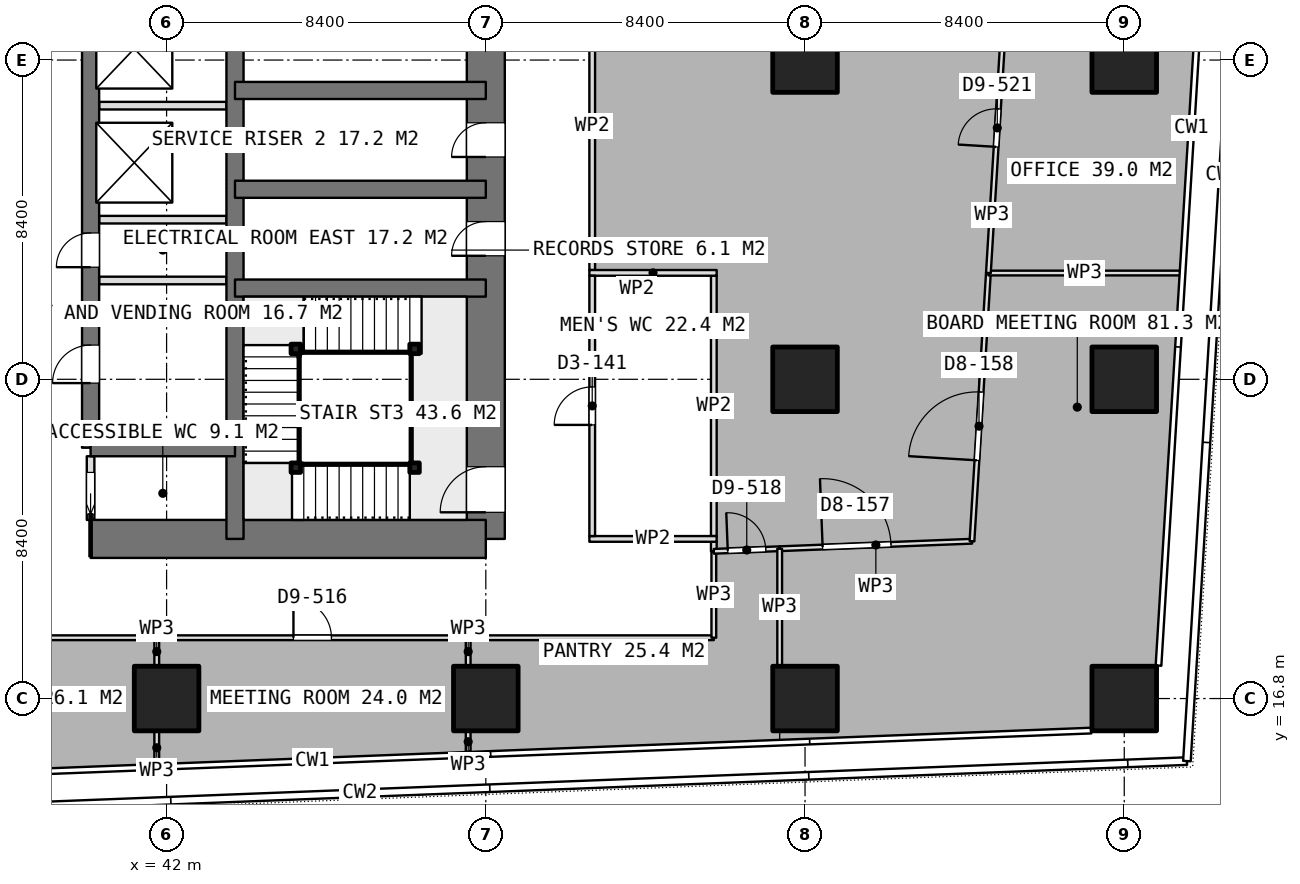
"""IFC4 building model, lengths in metres.
Left out: names, types, materials, properties, quantities, classifications, styles, units other than length and angle.
Written with IfcOpenShell. Run it as: python <this file> out.ifc"""

import sys

from ifc_helpers import new_model, si_unit, direction, frame, frame_2d, origin, origin_2d, place, context, subcontext, project, spatial, rectangle, extrude, element, fill, save


model = new_model("IFC4")
c1 = context("Model", 3, precision=1e-05, world=origin(), true_north=direction((0.0, 1.0)))
c2 = subcontext(c1, "Body", "Model", "MODEL_VIEW")
j1 = project(units=[si_unit("LENGTHUNIT", "METRE"), si_unit("PLANEANGLEUNIT", "RADIAN")], contexts=[c1])
p1 = place(None, origin())
s1 = spatial("IfcSite", under=j1, at=p1, CompositionType="ELEMENT")
p2 = place(p1, origin())
s2 = spatial("IfcBuilding", under=s1, at=p2, CompositionType="ELEMENT")
p3 = place(p2, frame((0.0, 0.0, 132.8)))
s3 = spatial("IfcBuildingStorey", under=s2, at=p3, CompositionType="ELEMENT", Elevation=132.8)
p4 = place(p3, frame((40.0, 21.0, 0.0), z_axis=(0.0, 0.0, 1.0), x_axis=(1.0, 0.0, 0.0)))
e1 = element("IfcWall", 1, at=p4, inside=s3, PredefinedType="SHEAR", context=c2, shape_type="SweptSolid", body=[
    extrude(rectangle(XDim=10.4, YDim=1.0, at=frame_2d((5.2, 0.0))), origin(), (0.0, 0.0, 1.0), 3.75),
])
p5 = place(p3, frame((50.4, 21.0, 0.0), z_axis=(0.0, 0.0, 1.0), x_axis=(0.0, 1.0, 0.0)))
e2 = element("IfcWall", 2, at=p5, inside=s3, PredefinedType="SHEAR", context=c2, shape_type="SweptSolid", body=[
    extrude(rectangle(XDim=25.2, YDim=1.0, at=frame_2d((12.6, 0.0))), origin(), (0.0, 0.0, 1.0), 3.75),
])
p6 = place(p5, frame((16.2, 0.0, 0.0)))
e3 = element("IfcOpeningElement", 3, at=p6, cuts=e2, PredefinedType="OPENING", context=c2, shape_type="SweptSolid", body=[
    extrude(rectangle(XDim=1.2, YDim=2.1, at=frame_2d((0.6, 1.05))), frame((0.0, 0.51, 0.0), z_axis=(0.0, -1.0, 0.0), x_axis=(1.0, 0.0, 0.0)), (0.0, 0.0, 1.0), 1.02),
])
p7 = place(p5, frame((10.05, 0.0, 0.0)))
e4 = element("IfcOpeningElement", 4, at=p7, cuts=e2, PredefinedType="OPENING", context=c2, shape_type="SweptSolid", body=[
    extrude(rectangle(XDim=0.9, YDim=2.1, at=frame_2d((0.45, 1.05))), frame((0.0, 0.51, 0.0), z_axis=(0.0, -1.0, 0.0), x_axis=(1.0, 0.0, 0.0)), (0.0, 0.0, 1.0), 1.02),
])
p8 = place(p5, frame((7.45, 0.0, 0.0)))
e5 = element("IfcOpeningElement", 5, at=p8, cuts=e2, PredefinedType="OPENING", context=c2, shape_type="SweptSolid", body=[
    extrude(rectangle(XDim=0.9, YDim=2.1, at=frame_2d((0.45, 1.05))), frame((0.0, 0.51, 0.0), z_axis=(0.0, -1.0, 0.0), x_axis=(1.0, 0.0, 0.0)), (0.0, 0.0, 1.0), 1.02),
])
p9 = place(p5, frame((0.7, 0.0, 0.0)))
e6 = element("IfcOpeningElement", 6, at=p9, cuts=e2, PredefinedType="OPENING", context=c2, shape_type="SweptSolid", body=[
    extrude(rectangle(XDim=1.2, YDim=2.1, at=frame_2d((0.6, 1.05))), frame((0.0, 0.51, 0.0), z_axis=(0.0, -1.0, 0.0), x_axis=(1.0, 0.0, 0.0)), (0.0, 0.0, 1.0), 1.02),
])
p10 = place(p3, frame((43.8, 21.0, 0.0), z_axis=(0.0, 0.0, 1.0), x_axis=(0.0, 1.0, 0.0)))
e7 = element("IfcWall", 7, at=p10, inside=s3, PredefinedType="SHEAR", context=c2, shape_type="SweptSolid", body=[
    extrude(rectangle(XDim=25.2, YDim=0.45, at=frame_2d((12.6, 0.0))), origin(), (0.0, 0.0, 1.0), 3.75),
])
p11 = place(p3, frame((40.0, 23.4, 0.0), z_axis=(0.0, 0.0, 1.0), x_axis=(0.0, 1.0, 0.0)))
e8 = element("IfcWall", 8, at=p11, inside=s3, PredefinedType="SHEAR", context=c2, shape_type="SweptSolid", body=[
    extrude(rectangle(XDim=18.0, YDim=0.45, at=frame_2d((9.0, 0.0))), origin(), (0.0, 0.0, 1.0), 3.75),
])
p12 = place(p11, frame((1.7, 0.0, 0.0)))
e9 = element("IfcOpeningElement", 9, at=p12, cuts=e8, PredefinedType="OPENING", context=c2, shape_type="SweptSolid", body=[
    extrude(rectangle(XDim=1.0, YDim=2.1, at=frame_2d((0.5, 1.05))), frame((0.0, 0.235, 0.0), z_axis=(0.0, -1.0, 0.0), x_axis=(1.0, 0.0, 0.0)), (0.0, 0.0, 1.0), 0.47),
])
p13 = place(p11, frame((4.75, 0.0, 0.0)))
e10 = element("IfcOpeningElement", 10, at=p13, cuts=e8, PredefinedType="OPENING", context=c2, shape_type="SweptSolid", body=[
    extrude(rectangle(XDim=0.9, YDim=2.1, at=frame_2d((0.45, 1.05))), frame((0.0, 0.235, 0.0), z_axis=(0.0, -1.0, 0.0), x_axis=(1.0, 0.0, 0.0)), (0.0, 0.0, 1.0), 0.47),
])
p14 = place(p3, frame((40.0, 23.4, 0.0), z_axis=(0.0, 0.0, 1.0), x_axis=(1.0, 0.0, 0.0)))
e11 = element("IfcWall", 11, at=p14, inside=s3, PredefinedType="SHEAR", context=c2, shape_type="SweptSolid", body=[
    extrude(rectangle(XDim=3.8, YDim=0.45, at=frame_2d((1.9, 0.0))), origin(), (0.0, 0.0, 1.0), 3.75),
])
for number, where, z_axis, x_axis in (
    (12, (43.8, 27.6, 0.0), (0.0, 0.0, 1.0), (1.0, 0.0, 0.0)),
    (13, (43.8, 30.2, 0.0), (0.0, 0.0, 1.0), (1.0, 0.0, 0.0)),
    (14, (43.8, 32.8, 0.0), (0.0, 0.0, 1.0), (1.0, 0.0, 0.0)),
):
    element("IfcWall", number, at=place(p3, frame(where, z_axis=z_axis, x_axis=x_axis)), inside=s3, PredefinedType="SHEAR", context=c2, shape_type="SweptSolid", body=[
        extrude(rectangle(XDim=6.6, YDim=0.45, at=frame_2d((3.3, 0.0))), origin(), (0.0, 0.0, 1.0), 3.75),
    ])
for number, where, z_axis, x_axis in (
    (15, (42.0, 16.8, 0.0), (0.0, 0.0, 1.0), (1.0, 0.0, 0.0)),
    (16, (50.4, 16.8, 0.0), (0.0, 0.0, 1.0), (1.0, 0.0, 0.0)),
    (17, (58.8, 16.8, 0.0), (0.0, 0.0, 1.0), (1.0, 0.0, 0.0)),
    (18, (58.8, 25.2, 0.0), (0.0, 0.0, 1.0), (1.0, 0.0, 0.0)),
    (19, (58.8, 33.6, 0.0), (0.0, 0.0, 1.0), (1.0, 0.0, 0.0)),
    (20, (67.2, 16.8, 0.0), (0.0, 0.0, 1.0), (1.0, 0.0, 0.0)),
    (21, (67.2, 25.2, 0.0), (0.0, 0.0, 1.0), (1.0, 0.0, 0.0)),
    (22, (67.2, 33.6, 0.0), (0.0, 0.0, 1.0), (1.0, 0.0, 0.0)),
):
    element("IfcColumn", number, at=place(p3, frame(where, z_axis=z_axis, x_axis=x_axis)), inside=s3, PredefinedType="COLUMN", context=c2, shape_type="SweptSolid", body=[
        extrude(rectangle(XDim=1.7, YDim=1.7, at=origin_2d()), origin(), (0.0, 0.0, 1.0), 3.75),
    ])
for number, where, z_axis, x_axis in (
    (23, (40.225, 29.4, 0.0), (0.0, 0.0, 1.0), (1.0, 0.0, 0.0)),
    (24, (40.225, 32.4, 0.0), (0.0, 0.0, 1.0), (1.0, 0.0, 0.0)),
):
    element("IfcWall", number, at=place(p3, frame(where, z_axis=z_axis, x_axis=x_axis)), inside=s3, PredefinedType="PARTITIONING", context=c2, shape_type="SweptSolid", body=[
        extrude(rectangle(XDim=3.35, YDim=0.2, at=frame_2d((1.675, 0.0))), origin(), (0.0, 0.0, 1.0), 3.5),
    ])
p15 = place(p3, frame((40.0, 21.5, 0.0), z_axis=(0.0, 0.0, 1.0), x_axis=(0.0, 1.0, 0.0)))
e25 = element("IfcWall", 25, at=p15, inside=s3, PredefinedType="PARTITIONING", context=c2, shape_type="SweptSolid", body=[
    extrude(rectangle(XDim=1.675, YDim=0.2, at=frame_2d((0.837, 0.0))), origin(), (0.0, 0.0, 1.0), 3.5),
])
p16 = place(p15, frame((0.15, 0.0, 0.0)))
e26 = element("IfcOpeningElement", 26, at=p16, cuts=e25, PredefinedType="OPENING", context=c2, shape_type="SweptSolid", body=[
    extrude(rectangle(XDim=1.1, YDim=2.1, at=frame_2d((0.55, 1.05))), frame((0.0, 0.11, 0.0), z_axis=(0.0, -1.0, 0.0), x_axis=(1.0, 0.0, 0.0)), (0.0, 0.0, 1.0), 0.22),
])
p17 = place(p3, frame((40.225, 27.8, 0.0), z_axis=(0.0, 0.0, 1.0), x_axis=(1.0, 0.0, 0.0)))
e27 = element("IfcWall", 27, at=p17, inside=s3, PredefinedType="PARTITIONING", context=c2, shape_type="SweptSolid", body=[
    extrude(rectangle(XDim=3.35, YDim=0.2, at=frame_2d((1.675, 0.0))), origin(), (0.0, 0.0, 1.0), 3.5),
])
for number, where, z_axis, x_axis in (
    (28, (53.125, 21.0, 0.0), (0.0, 0.0, 1.0), (1.0, 0.0, 0.0)),
    (29, (53.125, 28.0, 0.0), (0.0, 0.0, 1.0), (1.0, 0.0, 0.0)),
):
    element("IfcWall", number, at=place(p3, frame(where, z_axis=z_axis, x_axis=x_axis)), inside=s3, PredefinedType="PARTITIONING", context=c2, shape_type="SweptSolid", body=[
        extrude(rectangle(XDim=3.35, YDim=0.15, at=frame_2d((1.675, 0.0))), origin(), (0.0, 0.0, 1.0), 3.5),
    ])
p18 = place(p3, frame((53.2, 21.075, 0.0), z_axis=(0.0, 0.0, 1.0), x_axis=(0.0, 1.0, 0.0)))
e30 = element("IfcWall", 30, at=p18, inside=s3, PredefinedType="PARTITIONING", context=c2, shape_type="SweptSolid", body=[
    extrude(rectangle(XDim=6.85, YDim=0.15, at=frame_2d((3.425, 0.0))), origin(), (0.0, 0.0, 1.0), 3.5),
])
p19 = place(p18, frame((2.925, 0.0, 0.0)))
e31 = element("IfcOpeningElement", 31, at=p19, cuts=e30, PredefinedType="OPENING", context=c2, shape_type="SweptSolid", body=[
    extrude(rectangle(XDim=1.0, YDim=2.1, at=frame_2d((0.5, 1.05))), frame((0.0, 0.085, 0.0), z_axis=(0.0, -1.0, 0.0), x_axis=(1.0, 0.0, 0.0)), (0.0, 0.0, 1.0), 0.17),
])
p20 = place(p3, frame((56.4, 21.075, 0.0), z_axis=(0.0, 0.0, 1.0), x_axis=(0.0, 1.0, 0.0)))
e32 = element("IfcWall", 32, at=p20, inside=s3, PredefinedType="PARTITIONING", context=c2, shape_type="SweptSolid", body=[
    extrude(rectangle(XDim=6.85, YDim=0.15, at=frame_2d((3.425, 0.0))), origin(), (0.0, 0.0, 1.0), 3.5),
])
p21 = place(p3, frame((41.741, 18.4, 0.0), z_axis=(0.0, 0.0, 1.0), x_axis=(1.0, 0.0, 0.0)))
e33 = element("IfcWall", 33, at=p21, inside=s3, PredefinedType="PARTITIONING", context=c2, shape_type="SweptSolid", body=[
    extrude(rectangle(XDim=8.195, YDim=0.125, at=frame_2d((4.098, 0.0))), origin(), (0.0, 0.0, 1.0), 3.5),
])
p22 = place(p21, frame((3.597, 0.0, 0.0)))
e34 = element("IfcOpeningElement", 34, at=p22, cuts=e33, PredefinedType="OPENING", context=c2, shape_type="SweptSolid", body=[
    extrude(rectangle(XDim=1.0, YDim=2.1, at=frame_2d((0.5, 1.05))), frame((0.0, 0.073, 0.0), z_axis=(0.0, -1.0, 0.0), x_axis=(1.0, 0.0, 0.0)), (0.0, 0.0, 1.0), 0.145),
])
p23 = place(p3, frame((49.936, 18.4, 0.0), z_axis=(0.0, 0.0, 1.0), x_axis=(0.0, -1.0, 0.0)))
e35 = element("IfcWall", 35, at=p23, inside=s3, PredefinedType="PARTITIONING", context=c2, shape_type="SweptSolid", body=[
    extrude(rectangle(XDim=0.73, YDim=0.125, at=frame_2d((0.365, 0.0))), origin(), (0.0, 0.0, 1.0), 3.5),
])
p24 = place(p3, frame((49.936, 15.93, 0.0), z_axis=(0.0, 0.0, 1.0), x_axis=(0.0, -1.0, 0.0)))
e36 = element("IfcWall", 36, at=p24, inside=s3, PredefinedType="PARTITIONING", context=c2, shape_type="SweptSolid", body=[
    extrude(rectangle(XDim=0.531, YDim=0.125, at=frame_2d((0.266, 0.0))), origin(), (0.0, 0.0, 1.0), 3.5),
])
p25 = place(p3, frame((41.741, 15.08, 0.0), z_axis=(0.0, 0.0, 1.0), x_axis=(0.0, 1.0, 0.0)))
e37 = element("IfcWall", 37, at=p25, inside=s3, PredefinedType="PARTITIONING", context=c2, shape_type="SweptSolid", body=[
    extrude(rectangle(XDim=0.85, YDim=0.125, at=frame_2d((0.425, 0.0))), origin(), (0.0, 0.0, 1.0), 3.5),
])
p26 = place(p3, frame((41.741, 17.67, 0.0), z_axis=(0.0, 0.0, 1.0), x_axis=(0.0, 1.0, 0.0)))
e38 = element("IfcWall", 38, at=p26, inside=s3, PredefinedType="PARTITIONING", context=c2, shape_type="SweptSolid", body=[
    extrude(rectangle(XDim=0.73, YDim=0.125, at=frame_2d((0.365, 0.0))), origin(), (0.0, 0.0, 1.0), 3.5),
])
p27 = place(p3, frame((49.937, 18.4, 0.0), z_axis=(0.0, 0.0, 1.0), x_axis=(1.0, 0.0, 0.0)))
e39 = element("IfcWall", 39, at=p27, inside=s3, PredefinedType="PARTITIONING", context=c2, shape_type="SweptSolid", body=[
    extrude(rectangle(XDim=6.463, YDim=0.125, at=frame_2d((3.231, 0.0))), origin(), (0.0, 0.0, 1.0), 3.5),
])
p28 = place(p3, frame((56.4, 18.4, 0.0), z_axis=(0.0, 0.0, 1.0), x_axis=(0.0, 1.0, 0.0)))
e40 = element("IfcWall", 40, at=p28, inside=s3, PredefinedType="PARTITIONING", context=c2, shape_type="SweptSolid", body=[
    extrude(rectangle(XDim=2.274, YDim=0.125, at=frame_2d((1.137, 0.0))), origin(), (0.0, 0.0, 1.0), 3.5),
])
p29 = place(p3, frame((56.4, 20.674, 0.0), z_axis=(0.0, 0.0, 1.0), x_axis=(0.999234110548, 0.039130452561, 0.0)))
e41 = element("IfcWall", 41, at=p29, inside=s3, PredefinedType="PARTITIONING", context=c2, shape_type="SweptSolid", body=[
    extrude(rectangle(XDim=1.734, YDim=0.125, at=frame_2d((0.867, 0.0))), origin(), (0.0, 0.0, 1.0), 3.5),
])
p30 = place(p29, frame((0.367, 0.0, 0.0)))
e42 = element("IfcOpeningElement", 42, at=p30, cuts=e41, PredefinedType="OPENING", context=c2, shape_type="SweptSolid", body=[
    extrude(rectangle(XDim=1.0, YDim=2.1, at=frame_2d((0.5, 1.05))), frame((0.0, 0.073, 0.0), z_axis=(0.0, -1.0, 0.0), x_axis=(1.0, 0.0, 0.0)), (0.0, 0.0, 1.0), 0.145),
])
p31 = place(p3, frame((58.133, 20.742, 0.0), z_axis=(0.0, 0.0, 1.0), x_axis=(0.0, -1.0, 0.0)))
e43 = element("IfcWall", 43, at=p31, inside=s3, PredefinedType="PARTITIONING", context=c2, shape_type="SweptSolid", body=[
    extrude(rectangle(XDim=3.072, YDim=0.125, at=frame_2d((1.536, 0.0))), origin(), (0.0, 0.0, 1.0), 3.5),
])
p32 = place(p3, frame((58.134, 20.742, 0.0), z_axis=(0.0, 0.0, 1.0), x_axis=(0.999242539351, 0.038914618727, 0.0)))
e44 = element("IfcWall", 44, at=p32, inside=s3, PredefinedType="PARTITIONING", context=c2, shape_type="SweptSolid", body=[
    extrude(rectangle(XDim=5.063, YDim=0.125, at=frame_2d((2.531, 0.0))), origin(), (0.0, 0.0, 1.0), 3.5),
])
p33 = place(p32, frame((1.13, 0.0, 0.0)))
e45 = element("IfcOpeningElement", 45, at=p33, cuts=e44, PredefinedType="OPENING", context=c2, shape_type="SweptSolid", body=[
    extrude(rectangle(XDim=1.8, YDim=2.1, at=frame_2d((0.9, 1.05))), frame((0.0, 0.073, 0.0), z_axis=(0.0, -1.0, 0.0), x_axis=(1.0, 0.0, 0.0)), (0.0, 0.0, 1.0), 0.145),
])
p34 = place(p3, frame((63.193, 20.939, 0.0), z_axis=(0.0, 0.0, 1.0), x_axis=(0.061084086736, 0.998132623627, 0.0)))
e46 = element("IfcWall", 46, at=p34, inside=s3, PredefinedType="PARTITIONING", context=c2, shape_type="SweptSolid", body=[
    extrude(rectangle(XDim=7.07, YDim=0.125, at=frame_2d((3.535, 0.0))), origin(), (0.0, 0.0, 1.0), 3.5),
])
p35 = place(p34, frame((2.133, 0.0, 0.0)))
e47 = element("IfcOpeningElement", 47, at=p35, cuts=e46, PredefinedType="OPENING", context=c2, shape_type="SweptSolid", body=[
    extrude(rectangle(XDim=1.8, YDim=2.1, at=frame_2d((0.9, 1.05))), frame((0.0, 0.073, 0.0), z_axis=(0.0, -1.0, 0.0), x_axis=(1.0, 0.0, 0.0)), (0.0, 0.0, 1.0), 0.145),
])
p36 = place(p3, frame((63.625, 27.996, 0.0), z_axis=(0.0, 0.0, 1.0), x_axis=(1.0, 0.0, 0.0)))
e48 = element("IfcWall", 48, at=p36, inside=s3, PredefinedType="PARTITIONING", context=c2, shape_type="SweptSolid", body=[
    extrude(rectangle(XDim=5.059, YDim=0.125, at=frame_2d((2.53, 0.0))), origin(), (0.0, 0.0, 1.0), 3.5),
])
p37 = place(p3, frame((63.625, 27.997, 0.0), z_axis=(0.0, 0.0, 1.0), x_axis=(0.061176245149, 0.998126979412, 0.0)))
e49 = element("IfcWall", 49, at=p37, inside=s3, PredefinedType="PARTITIONING", context=c2, shape_type="SweptSolid", body=[
    extrude(rectangle(XDim=7.65, YDim=0.125, at=frame_2d((3.825, 0.0))), origin(), (0.0, 0.0, 1.0), 3.5),
])
p38 = place(p37, frame((3.325, 0.0, 0.0)))
e50 = element("IfcOpeningElement", 50, at=p38, cuts=e49, PredefinedType="OPENING", context=c2, shape_type="SweptSolid", body=[
    extrude(rectangle(XDim=1.0, YDim=2.1, at=frame_2d((0.5, 1.05))), frame((0.0, 0.073, 0.0), z_axis=(0.0, -1.0, 0.0), x_axis=(1.0, 0.0, 0.0)), (0.0, 0.0, 1.0), 0.145),
])
p39 = place(p3, frame((33.826, 18.4, 0.0), z_axis=(0.0, 0.0, 1.0), x_axis=(1.0, 0.0, 0.0)))
e51 = element("IfcWall", 51, at=p39, inside=s3, PredefinedType="PARTITIONING", context=c2, shape_type="SweptSolid", body=[
    extrude(rectangle(XDim=7.914, YDim=0.125, at=frame_2d((3.957, 0.0))), origin(), (0.0, 0.0, 1.0), 3.5),
])
p40 = place(p39, frame((3.457, 0.0, 0.0)))
e52 = element("IfcOpeningElement", 52, at=p40, cuts=e51, PredefinedType="OPENING", context=c2, shape_type="SweptSolid", body=[
    extrude(rectangle(XDim=1.0, YDim=2.1, at=frame_2d((0.5, 1.05))), frame((0.0, 0.073, 0.0), z_axis=(0.0, -1.0, 0.0), x_axis=(1.0, 0.0, 0.0)), (0.0, 0.0, 1.0), 0.145),
])
p41 = place(p3, frame((56.4, 20.674, 0.0), z_axis=(0.0, 0.0, 1.0), x_axis=(0.0, 1.0, 0.0)))
e53 = element("IfcWall", 53, at=p41, inside=s3, PredefinedType="PARTITIONING", context=c2, shape_type="SweptSolid", body=[
    extrude(rectangle(XDim=0.251, YDim=0.15, at=frame_2d((0.125, 0.0))), origin(), (0.0, 0.0, 1.0), 3.5),
])
p42 = place(p3, frame((53.2, 28.075, 0.0), z_axis=(0.0, 0.0, 1.0), x_axis=(0.0, 1.0, 0.0)))
e54 = element("IfcWall", 54, at=p42, inside=s3, PredefinedType="PARTITIONING", context=c2, shape_type="SweptSolid", body=[
    extrude(rectangle(XDim=7.562, YDim=0.15, at=frame_2d((3.781, 0.0))), origin(), (0.0, 0.0, 1.0), 3.5),
])
for number, where, z_axis, x_axis in (
    (55, (48.525, 22.875, 0.0), (0.0, 0.0, 1.0), (1.0, 0.0, 0.0)),
    (56, (45.4, 22.875, 0.0), (0.0, 0.0, 1.0), (1.0, 0.0, 0.0)),
    (57, (45.4, 26.0, 0.0), (0.0, 0.0, 1.0), (1.0, 0.0, 0.0)),
    (58, (48.525, 26.0, 0.0), (0.0, 0.0, 1.0), (1.0, 0.0, 0.0)),
):
    element("IfcColumn", number, at=place(p3, frame(where, z_axis=z_axis, x_axis=x_axis)), inside=s3, PredefinedType="COLUMN", context=c2, shape_type="SweptSolid", body=[
        extrude(rectangle(XDim=0.25, YDim=0.25, at=origin_2d()), origin(), (0.0, 0.0, 1.0), 3.75),
    ])
p43 = place(p7, origin())
e59 = element("IfcDoor", 59, at=p43, inside=s3, OperationType="SINGLE_SWING_LEFT", PredefinedType="DOOR", context=c2, shape_type="SweptSolid", body=[
    extrude(rectangle(XDim=0.9, YDim=2.1, at=frame_2d((0.45, 1.05))), frame((0.0, 0.025, 0.0), z_axis=(0.0, -1.0, 0.0), x_axis=(1.0, 0.0, 0.0)), (0.0, 0.0, 1.0), 0.05),
])
fill(e4, e59)
p44 = place(p8, origin())
e60 = element("IfcDoor", 60, at=p44, inside=s3, OperationType="SINGLE_SWING_LEFT", PredefinedType="DOOR", context=c2, shape_type="SweptSolid", body=[
    extrude(rectangle(XDim=0.9, YDim=2.1, at=frame_2d((0.45, 1.05))), frame((0.0, 0.025, 0.0), z_axis=(0.0, -1.0, 0.0), x_axis=(1.0, 0.0, 0.0)), (0.0, 0.0, 1.0), 0.05),
])
fill(e5, e60)
p45 = place(p16, origin())
e61 = element("IfcDoor", 61, at=p45, inside=s3, OperationType="SLIDING_TO_LEFT", PredefinedType="DOOR", context=c2, shape_type="SweptSolid", body=[
    extrude(rectangle(XDim=1.1, YDim=2.1, at=frame_2d((0.55, 1.05))), frame((0.0, 0.025, 0.0), z_axis=(0.0, -1.0, 0.0), x_axis=(1.0, 0.0, 0.0)), (0.0, 0.0, 1.0), 0.05),
])
fill(e26, e61)
p46 = place(p12, origin())
e62 = element("IfcDoor", 62, at=p46, inside=s3, OperationType="SINGLE_SWING_LEFT", PredefinedType="DOOR", context=c2, shape_type="SweptSolid", body=[
    extrude(rectangle(XDim=1.0, YDim=2.1, at=frame_2d((0.5, 1.05))), frame((0.0, 0.025, 0.0), z_axis=(0.0, -1.0, 0.0), x_axis=(1.0, 0.0, 0.0)), (0.0, 0.0, 1.0), 0.05),
])
fill(e9, e62)
p47 = place(p13, origin())
e63 = element("IfcDoor", 63, at=p47, inside=s3, OperationType="SINGLE_SWING_LEFT", PredefinedType="DOOR", context=c2, shape_type="SweptSolid", body=[
    extrude(rectangle(XDim=0.9, YDim=2.1, at=frame_2d((0.45, 1.05))), frame((0.0, 0.025, 0.0), z_axis=(0.0, -1.0, 0.0), x_axis=(1.0, 0.0, 0.0)), (0.0, 0.0, 1.0), 0.05),
])
fill(e10, e63)
p48 = place(p19, origin())
e64 = element("IfcDoor", 64, at=p48, inside=s3, OperationType="SINGLE_SWING_LEFT", PredefinedType="DOOR", context=c2, shape_type="SweptSolid", body=[
    extrude(rectangle(XDim=1.0, YDim=2.1, at=frame_2d((0.5, 1.05))), frame((0.0, 0.025, 0.0), z_axis=(0.0, -1.0, 0.0), x_axis=(1.0, 0.0, 0.0)), (0.0, 0.0, 1.0), 0.05),
])
fill(e31, e64)
p49 = place(p22, origin())
e65 = element("IfcDoor", 65, at=p49, inside=s3, OperationType="SINGLE_SWING_LEFT", PredefinedType="DOOR", context=c2, shape_type="SweptSolid", body=[
    extrude(rectangle(XDim=1.0, YDim=2.1, at=frame_2d((0.5, 1.05))), frame((0.0, 0.025, 0.0), z_axis=(0.0, -1.0, 0.0), x_axis=(1.0, 0.0, 0.0)), (0.0, 0.0, 1.0), 0.05),
])
fill(e34, e65)
p50 = place(p30, origin())
e66 = element("IfcDoor", 66, at=p50, inside=s3, OperationType="SINGLE_SWING_LEFT", PredefinedType="DOOR", context=c2, shape_type="SweptSolid", body=[
    extrude(rectangle(XDim=1.0, YDim=2.1, at=frame_2d((0.5, 1.05))), frame((0.0, 0.025, 0.0), z_axis=(0.0, -1.0, 0.0), x_axis=(1.0, 0.0, 0.0)), (0.0, 0.0, 1.0), 0.05),
])
fill(e42, e66)
p51 = place(p35, origin())
e67 = element("IfcDoor", 67, at=p51, inside=s3, OperationType="DOUBLE_DOOR_SINGLE_SWING", PredefinedType="DOOR", context=c2, shape_type="SweptSolid", body=[
    extrude(rectangle(XDim=1.8, YDim=2.1, at=frame_2d((0.9, 1.05))), frame((0.0, 0.025, 0.0), z_axis=(0.0, -1.0, 0.0), x_axis=(1.0, 0.0, 0.0)), (0.0, 0.0, 1.0), 0.05),
])
fill(e47, e67)
p52 = place(p33, origin())
e68 = element("IfcDoor", 68, at=p52, inside=s3, OperationType="DOUBLE_DOOR_SINGLE_SWING", PredefinedType="DOOR", context=c2, shape_type="SweptSolid", body=[
    extrude(rectangle(XDim=1.8, YDim=2.1, at=frame_2d((0.9, 1.05))), frame((0.0, 0.025, 0.0), z_axis=(0.0, -1.0, 0.0), x_axis=(1.0, 0.0, 0.0)), (0.0, 0.0, 1.0), 0.05),
])
fill(e45, e68)
p53 = place(p38, origin())
e69 = element("IfcDoor", 69, at=p53, inside=s3, OperationType="SINGLE_SWING_LEFT", PredefinedType="DOOR", context=c2, shape_type="SweptSolid", body=[
    extrude(rectangle(XDim=1.0, YDim=2.1, at=frame_2d((0.5, 1.05))), frame((0.0, 0.025, 0.0), z_axis=(0.0, -1.0, 0.0), x_axis=(1.0, 0.0, 0.0)), (0.0, 0.0, 1.0), 0.05),
])
fill(e50, e69)
p54 = place(p9, origin())
e70 = element("IfcDoor", 70, at=p54, inside=s3, OperationType="SINGLE_SWING_RIGHT", PredefinedType="DOOR", context=c2, shape_type="SweptSolid", body=[
    extrude(rectangle(XDim=1.2, YDim=2.1, at=frame_2d((0.6, 1.05))), frame((0.0, 0.025, 0.0), z_axis=(0.0, -1.0, 0.0), x_axis=(1.0, 0.0, 0.0)), (0.0, 0.0, 1.0), 0.05),
])
fill(e6, e70)
save(model, sys.argv[1])
